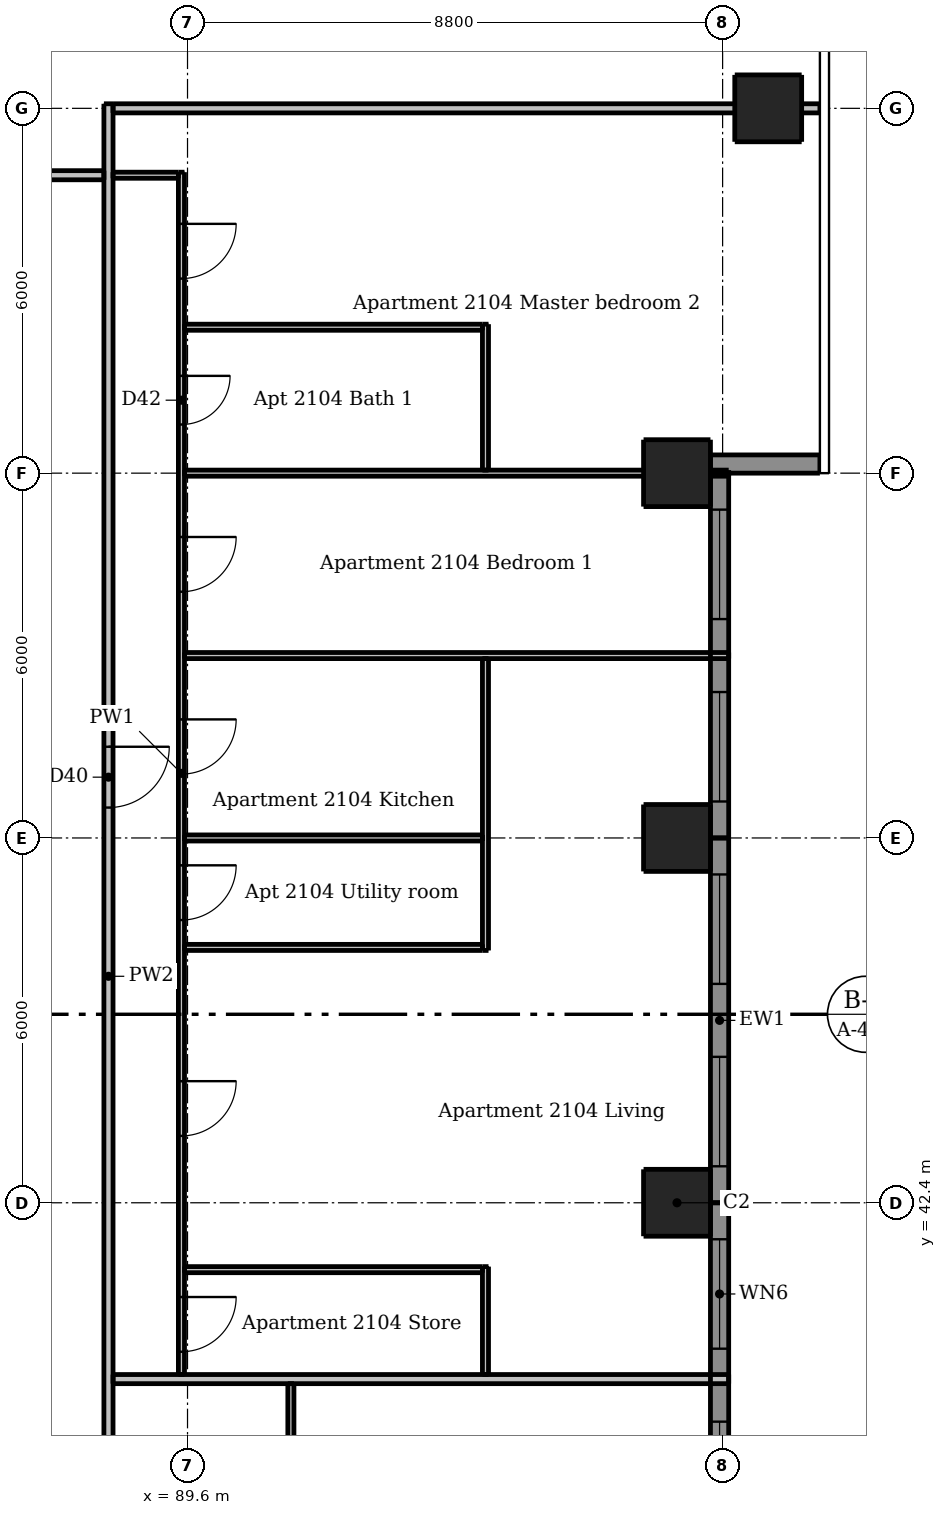
"""IFC4 building model, lengths in metres.
Left out: names, types, materials, properties, quantities, classifications, styles, units other than length and angle.
Written with IfcOpenShell. Run it as: python <this file> out.ifc"""

import sys

from ifc_helpers import new_model, si_unit, direction, frame, frame_2d, origin, origin_2d, place, context, subcontext, project, spatial, rectangle, extrude, element, fill, save


model = new_model("IFC4")
c1 = context("Model", 3, precision=1e-05, world=origin(), true_north=direction((0.0, 1.0)))
c2 = subcontext(c1, "Body", "Model", "MODEL_VIEW")
j1 = project(units=[si_unit("LENGTHUNIT", "METRE"), si_unit("PLANEANGLEUNIT", "RADIAN")], contexts=[c1])
p1 = place(None, origin())
s1 = spatial("IfcSite", under=j1, at=p1, CompositionType="ELEMENT")
p2 = place(p1, origin())
s2 = spatial("IfcBuilding", under=s1, at=p2, CompositionType="ELEMENT")
p3 = place(p2, frame((0.0, 0.0, 82.0)))
s3 = spatial("IfcBuildingStorey", under=s2, at=p3, CompositionType="ELEMENT", Elevation=82.0)
for number, where, z_axis, x_axis in (
    (1, (97.65, 42.4, 0.0), (0.0, 0.0, 1.0), (1.0, 0.0, 0.0)),
    (2, (97.65, 48.4, 0.0), (0.0, 0.0, 1.0), (1.0, 0.0, 0.0)),
    (3, (97.65, 54.4, 0.0), (0.0, 0.0, 1.0), (1.0, 0.0, 0.0)),
    (4, (99.15, 60.4, 0.0), (0.0, 0.0, 1.0), (1.0, 0.0, 0.0)),
):
    element("IfcColumn", number, at=place(p3, frame(where, z_axis=z_axis, x_axis=x_axis)), inside=s3, PredefinedType="COLUMN", context=c2, shape_type="SweptSolid", body=[
        extrude(rectangle(XDim=1.1, YDim=1.1, at=origin_2d()), origin(), (0.0, 0.0, 1.0), 3.05),
    ])
p4 = place(p3, frame((98.2, 54.55, 0.0), z_axis=(0.0, 0.0, 1.0), x_axis=(1.0, 0.0, 0.0)))
e5 = element("IfcWall", 5, at=p4, inside=s3, PredefinedType="SOLIDWALL", context=c2, shape_type="SweptSolid", body=[
    extrude(rectangle(XDim=1.8, YDim=0.3, at=frame_2d((0.9, 0.0))), origin(), (0.0, 0.0, 1.0), 3.05),
])
p5 = place(p3, frame((98.35, 36.7, 0.0), z_axis=(0.0, 0.0, 1.0), x_axis=(0.0, 1.0, 0.0)))
e6 = element("IfcWall", 6, at=p5, inside=s3, PredefinedType="SOLIDWALL", context=c2, shape_type="SweptSolid", body=[
    extrude(rectangle(XDim=5.7, YDim=0.3, at=frame_2d((2.85, 0.0))), origin(), (0.0, 0.0, 1.0), 3.05),
])
p6 = place(p5, frame((0.3, 0.0, 0.15)))
e7 = element("IfcOpeningElement", 7, at=p6, cuts=e6, PredefinedType="OPENING", context=c2, shape_type="SweptSolid", body=[
    extrude(rectangle(XDim=1.8, YDim=2.1, at=frame_2d((0.9, 1.05))), frame((0.0, 0.16, 0.0), z_axis=(0.0, -1.0, 0.0), x_axis=(1.0, 0.0, 0.0)), (0.0, 0.0, 1.0), 0.32),
])
p7 = place(p5, frame((3.3, 0.0, 0.15)))
e8 = element("IfcOpeningElement", 8, at=p7, cuts=e6, PredefinedType="OPENING", context=c2, shape_type="SweptSolid", body=[
    extrude(rectangle(XDim=1.8, YDim=2.1, at=frame_2d((0.9, 1.05))), frame((0.0, 0.16, 0.0), z_axis=(0.0, -1.0, 0.0), x_axis=(1.0, 0.0, 0.0)), (0.0, 0.0, 1.0), 0.32),
])
p8 = place(p3, frame((98.35, 42.4, 0.0), z_axis=(0.0, 0.0, 1.0), x_axis=(0.0, 1.0, 0.0)))
e9 = element("IfcWall", 9, at=p8, inside=s3, PredefinedType="SOLIDWALL", context=c2, shape_type="SweptSolid", body=[
    extrude(rectangle(XDim=6.0, YDim=0.3, at=frame_2d((3.0, 0.0))), origin(), (0.0, 0.0, 1.0), 3.05),
])
p9 = place(p8, frame((0.6, 0.0, 0.15)))
e10 = element("IfcOpeningElement", 10, at=p9, cuts=e9, PredefinedType="OPENING", context=c2, shape_type="SweptSolid", body=[
    extrude(rectangle(XDim=1.8, YDim=2.1, at=frame_2d((0.9, 1.05))), frame((0.0, 0.16, 0.0), z_axis=(0.0, -1.0, 0.0), x_axis=(1.0, 0.0, 0.0)), (0.0, 0.0, 1.0), 0.32),
])
p10 = place(p8, frame((3.6, 0.0, 0.15)))
e11 = element("IfcOpeningElement", 11, at=p10, cuts=e9, PredefinedType="OPENING", context=c2, shape_type="SweptSolid", body=[
    extrude(rectangle(XDim=1.8, YDim=2.1, at=frame_2d((0.9, 1.05))), frame((0.0, 0.16, 0.0), z_axis=(0.0, -1.0, 0.0), x_axis=(1.0, 0.0, 0.0)), (0.0, 0.0, 1.0), 0.32),
])
p11 = place(p3, frame((98.35, 48.4, 0.0), z_axis=(0.0, 0.0, 1.0), x_axis=(0.0, 1.0, 0.0)))
e12 = element("IfcWall", 12, at=p11, inside=s3, PredefinedType="SOLIDWALL", context=c2, shape_type="SweptSolid", body=[
    extrude(rectangle(XDim=6.0, YDim=0.3, at=frame_2d((3.0, 0.0))), origin(), (0.0, 0.0, 1.0), 3.05),
])
p12 = place(p11, frame((0.6, 0.0, 0.15)))
e13 = element("IfcOpeningElement", 13, at=p12, cuts=e12, PredefinedType="OPENING", context=c2, shape_type="SweptSolid", body=[
    extrude(rectangle(XDim=1.8, YDim=2.1, at=frame_2d((0.9, 1.05))), frame((0.0, 0.16, 0.0), z_axis=(0.0, -1.0, 0.0), x_axis=(1.0, 0.0, 0.0)), (0.0, 0.0, 1.0), 0.32),
])
p13 = place(p11, frame((3.6, 0.0, 0.15)))
e14 = element("IfcOpeningElement", 14, at=p13, cuts=e12, PredefinedType="OPENING", context=c2, shape_type="SweptSolid", body=[
    extrude(rectangle(XDim=1.8, YDim=2.1, at=frame_2d((0.9, 1.05))), frame((0.0, 0.16, 0.0), z_axis=(0.0, -1.0, 0.0), x_axis=(1.0, 0.0, 0.0)), (0.0, 0.0, 1.0), 0.32),
])
p14 = place(p3, frame((89.5, 59.35, 0.0), z_axis=(0.0, 0.0, 1.0), x_axis=(0.0, -1.0, 0.0)))
e15 = element("IfcWall", 15, at=p14, inside=s3, PredefinedType="PARTITIONING", context=c2, shape_type="SweptSolid", body=[
    extrude(rectangle(XDim=19.775, YDim=0.1, at=frame_2d((9.888, 0.0))), origin(), (0.0, 0.0, 1.0), 2.51),
])
p15 = place(p14, frame((14.95, 0.0, 0.0)))
e16 = element("IfcOpeningElement", 16, at=p15, cuts=e15, PredefinedType="OPENING", context=c2, shape_type="SweptSolid", body=[
    extrude(rectangle(XDim=0.9, YDim=2.1, at=frame_2d((0.45, 1.05))), frame((0.0, 0.06, 0.0), z_axis=(0.0, -1.0, 0.0), x_axis=(1.0, 0.0, 0.0)), (0.0, 0.0, 1.0), 0.12),
])
p16 = place(p14, frame((9.0, 0.0, 0.0)))
e17 = element("IfcOpeningElement", 17, at=p16, cuts=e15, PredefinedType="OPENING", context=c2, shape_type="SweptSolid", body=[
    extrude(rectangle(XDim=0.9, YDim=2.1, at=frame_2d((0.45, 1.05))), frame((0.0, 0.06, 0.0), z_axis=(0.0, -1.0, 0.0), x_axis=(1.0, 0.0, 0.0)), (0.0, 0.0, 1.0), 0.12),
])
p17 = place(p14, frame((11.4, 0.0, 0.0)))
e18 = element("IfcOpeningElement", 18, at=p17, cuts=e15, PredefinedType="OPENING", context=c2, shape_type="SweptSolid", body=[
    extrude(rectangle(XDim=0.9, YDim=2.1, at=frame_2d((0.45, 1.05))), frame((0.0, 0.06, 0.0), z_axis=(0.0, -1.0, 0.0), x_axis=(1.0, 0.0, 0.0)), (0.0, 0.0, 1.0), 0.12),
])
p18 = place(p14, frame((18.5, 0.0, 0.0)))
e19 = element("IfcOpeningElement", 19, at=p18, cuts=e15, PredefinedType="OPENING", context=c2, shape_type="SweptSolid", body=[
    extrude(rectangle(XDim=0.9, YDim=2.1, at=frame_2d((0.45, 1.05))), frame((0.0, 0.06, 0.0), z_axis=(0.0, -1.0, 0.0), x_axis=(1.0, 0.0, 0.0)), (0.0, 0.0, 1.0), 0.12),
])
p19 = place(p14, frame((6.0, 0.0, 0.0)))
e20 = element("IfcOpeningElement", 20, at=p19, cuts=e15, PredefinedType="OPENING", context=c2, shape_type="SweptSolid", body=[
    extrude(rectangle(XDim=0.9, YDim=2.1, at=frame_2d((0.45, 1.05))), frame((0.0, 0.06, 0.0), z_axis=(0.0, -1.0, 0.0), x_axis=(1.0, 0.0, 0.0)), (0.0, 0.0, 1.0), 0.12),
])
p20 = place(p14, frame((0.85, 0.0, 0.0)))
e21 = element("IfcOpeningElement", 21, at=p20, cuts=e15, PredefinedType="OPENING", context=c2, shape_type="SweptSolid", body=[
    extrude(rectangle(XDim=0.9, YDim=2.1, at=frame_2d((0.45, 1.05))), frame((0.0, 0.06, 0.0), z_axis=(0.0, -1.0, 0.0), x_axis=(1.0, 0.0, 0.0)), (0.0, 0.0, 1.0), 0.12),
])
p21 = place(p14, frame((3.35, 0.0, 0.0)))
e22 = element("IfcOpeningElement", 22, at=p21, cuts=e15, PredefinedType="OPENING", context=c2, shape_type="SweptSolid", body=[
    extrude(rectangle(XDim=0.8, YDim=2.1, at=frame_2d((0.4, 1.05))), frame((0.0, 0.06, 0.0), z_axis=(0.0, -1.0, 0.0), x_axis=(1.0, 0.0, 0.0)), (0.0, 0.0, 1.0), 0.12),
])
p22 = place(p3, frame((91.3, 33.45, 0.0), z_axis=(0.0, 0.0, 1.0), x_axis=(0.0, 1.0, 0.0)))
e23 = element("IfcWall", 23, at=p22, inside=s3, PredefinedType="PARTITIONING", context=c2, shape_type="SweptSolid", body=[
    extrude(rectangle(XDim=5.975, YDim=0.1, at=frame_2d((2.988, 0.0))), origin(), (0.0, 0.0, 1.0), 3.05),
])
p23 = place(p22, frame((3.8, 0.0, 0.0)))
e24 = element("IfcOpeningElement", 24, at=p23, cuts=e23, PredefinedType="OPENING", context=c2, shape_type="SweptSolid", body=[
    extrude(rectangle(XDim=0.8, YDim=2.1, at=frame_2d((0.4, 1.05))), frame((0.0, 0.06, 0.0), z_axis=(0.0, -1.0, 0.0), x_axis=(1.0, 0.0, 0.0)), (0.0, 0.0, 1.0), 0.12),
])
p24 = place(p3, frame((94.5, 39.575, 0.0), z_axis=(0.0, 0.0, 1.0), x_axis=(0.0, 1.0, 0.0)))
e25 = element("IfcWall", 25, at=p24, inside=s3, PredefinedType="PARTITIONING", context=c2, shape_type="SweptSolid", body=[
    extrude(rectangle(XDim=1.775, YDim=0.1, at=frame_2d((0.888, 0.0))), origin(), (0.0, 0.0, 1.0), 3.05),
])
p25 = place(p3, frame((94.5, 46.55, 0.0), z_axis=(0.0, 0.0, 1.0), x_axis=(0.0, 1.0, 0.0)))
e26 = element("IfcWall", 26, at=p25, inside=s3, PredefinedType="PARTITIONING", context=c2, shape_type="SweptSolid", body=[
    extrude(rectangle(XDim=4.8, YDim=0.1, at=frame_2d((2.4, 0.0))), origin(), (0.0, 0.0, 1.0), 3.05),
])
p26 = place(p3, frame((94.5, 54.45, 0.0), z_axis=(0.0, 0.0, 1.0), x_axis=(0.0, 1.0, 0.0)))
e27 = element("IfcWall", 27, at=p26, inside=s3, PredefinedType="PARTITIONING", context=c2, shape_type="SweptSolid", body=[
    extrude(rectangle(XDim=2.4, YDim=0.1, at=frame_2d((1.2, 0.0))), origin(), (0.0, 0.0, 1.0), 3.05),
])
p27 = place(p3, frame((88.375, 59.3, 0.0), z_axis=(0.0, 0.0, 1.0), x_axis=(1.0, 0.0, 0.0)))
e28 = element("IfcWall", 28, at=p27, inside=s3, PredefinedType="PARTITIONING", context=c2, shape_type="SweptSolid", body=[
    extrude(rectangle(XDim=1.075, YDim=0.1, at=frame_2d((0.538, 0.0))), origin(), (0.0, 0.0, 1.0), 3.05),
])
p28 = place(p3, frame((89.55, 56.8, 0.0), z_axis=(0.0, 0.0, 1.0), x_axis=(1.0, 0.0, 0.0)))
e29 = element("IfcWall", 29, at=p28, inside=s3, PredefinedType="PARTITIONING", context=c2, shape_type="SweptSolid", body=[
    extrude(rectangle(XDim=4.9, YDim=0.1, at=frame_2d((2.45, 0.0))), origin(), (0.0, 0.0, 1.0), 3.05),
])
p29 = place(p3, frame((89.55, 54.4, 0.0), z_axis=(0.0, 0.0, 1.0), x_axis=(1.0, 0.0, 0.0)))
e30 = element("IfcWall", 30, at=p29, inside=s3, PredefinedType="PARTITIONING", context=c2, shape_type="SweptSolid", body=[
    extrude(rectangle(XDim=8.95, YDim=0.1, at=frame_2d((4.475, 0.0))), origin(), (0.0, 0.0, 1.0), 2.516),
])
p30 = place(p3, frame((89.55, 51.4, 0.0), z_axis=(0.0, 0.0, 1.0), x_axis=(1.0, 0.0, 0.0)))
e31 = element("IfcWall", 31, at=p30, inside=s3, PredefinedType="PARTITIONING", context=c2, shape_type="SweptSolid", body=[
    extrude(rectangle(XDim=8.95, YDim=0.1, at=frame_2d((4.475, 0.0))), origin(), (0.0, 0.0, 1.0), 3.05),
])
p31 = place(p3, frame((89.55, 48.4, 0.0), z_axis=(0.0, 0.0, 1.0), x_axis=(1.0, 0.0, 0.0)))
e32 = element("IfcWall", 32, at=p31, inside=s3, PredefinedType="PARTITIONING", context=c2, shape_type="SweptSolid", body=[
    extrude(rectangle(XDim=4.9, YDim=0.1, at=frame_2d((2.45, 0.0))), origin(), (0.0, 0.0, 1.0), 2.516),
])
for number, where, z_axis, x_axis in (
    (33, (89.55, 46.6, 0.0), (0.0, 0.0, 1.0), (1.0, 0.0, 0.0)),
    (34, (89.55, 41.3, 0.0), (0.0, 0.0, 1.0), (1.0, 0.0, 0.0)),
):
    element("IfcWall", number, at=place(p3, frame(where, z_axis=z_axis, x_axis=x_axis)), inside=s3, PredefinedType="PARTITIONING", context=c2, shape_type="SweptSolid", body=[
        extrude(rectangle(XDim=4.9, YDim=0.1, at=frame_2d((2.45, 0.0))), origin(), (0.0, 0.0, 1.0), 3.05),
    ])
p32 = place(p3, frame((88.3, 60.475, 0.0), z_axis=(0.0, 0.0, 1.0), x_axis=(0.0, -1.0, 0.0)))
e35 = element("IfcWall", 35, at=p32, inside=s3, PredefinedType="PARTITIONING", context=c2, shape_type="SweptSolid", body=[
    extrude(rectangle(XDim=28.7, YDim=0.15, at=frame_2d((14.35, 0.0))), origin(), (0.0, 0.0, 1.0), 3.05),
])
p33 = place(p32, frame((27.425, 0.0, 0.0)))
e36 = element("IfcOpeningElement", 36, at=p33, cuts=e35, PredefinedType="OPENING", context=c2, shape_type="SweptSolid", body=[
    extrude(rectangle(XDim=1.0, YDim=2.1, at=frame_2d((0.5, 1.05))), frame((0.0, 0.085, 0.0), z_axis=(0.0, -1.0, 0.0), x_axis=(1.0, 0.0, 0.0)), (0.0, 0.0, 1.0), 0.17),
])
p34 = place(p32, frame((10.575, 0.0, 0.0)))
e37 = element("IfcOpeningElement", 37, at=p34, cuts=e35, PredefinedType="OPENING", context=c2, shape_type="SweptSolid", body=[
    extrude(rectangle(XDim=1.0, YDim=2.1, at=frame_2d((0.5, 1.05))), frame((0.0, 0.085, 0.0), z_axis=(0.0, -1.0, 0.0), x_axis=(1.0, 0.0, 0.0)), (0.0, 0.0, 1.0), 0.17),
])
p35 = place(p3, frame((88.375, 60.4, 0.0), z_axis=(0.0, 0.0, 1.0), x_axis=(1.0, 0.0, 0.0)))
e38 = element("IfcWall", 38, at=p35, inside=s3, PredefinedType="PARTITIONING", context=c2, shape_type="SweptSolid", body=[
    extrude(rectangle(XDim=11.625, YDim=0.15, at=frame_2d((5.812, 0.0))), origin(), (0.0, 0.0, 1.0), 2.516),
])
p36 = place(p3, frame((59.675, 59.3, 0.0), z_axis=(0.0, 0.0, 1.0), x_axis=(1.0, 0.0, 0.0)))
e39 = element("IfcWall", 39, at=p36, inside=s3, PredefinedType="PARTITIONING", context=c2, shape_type="SweptSolid", body=[
    extrude(rectangle(XDim=28.55, YDim=0.15, at=frame_2d((14.275, 0.0))), origin(), (0.0, 0.0, 1.0), 3.05),
])
p37 = place(p36, frame((8.975, 0.0, 0.0)))
e40 = element("IfcOpeningElement", 40, at=p37, cuts=e39, PredefinedType="OPENING", context=c2, shape_type="SweptSolid", body=[
    extrude(rectangle(XDim=1.0, YDim=2.1, at=frame_2d((0.5, 1.05))), frame((0.0, 0.085, 0.0), z_axis=(0.0, -1.0, 0.0), x_axis=(1.0, 0.0, 0.0)), (0.0, 0.0, 1.0), 0.17),
])
p38 = place(p36, frame((25.775, 0.0, 0.0)))
e41 = element("IfcOpeningElement", 41, at=p38, cuts=e39, PredefinedType="OPENING", context=c2, shape_type="SweptSolid", body=[
    extrude(rectangle(XDim=1.0, YDim=2.1, at=frame_2d((0.5, 1.05))), frame((0.0, 0.085, 0.0), z_axis=(0.0, -1.0, 0.0), x_axis=(1.0, 0.0, 0.0)), (0.0, 0.0, 1.0), 0.17),
])
p39 = place(p3, frame((88.375, 39.5, 0.0), z_axis=(0.0, 0.0, 1.0), x_axis=(1.0, 0.0, 0.0)))
e42 = element("IfcWall", 42, at=p39, inside=s3, PredefinedType="PARTITIONING", context=c2, shape_type="SweptSolid", body=[
    extrude(rectangle(XDim=10.125, YDim=0.15, at=frame_2d((5.062, 0.0))), origin(), (0.0, 0.0, 1.0), 3.05),
])
p40 = place(p6, origin())
e43 = element("IfcWindow", 43, at=p40, inside=s3, PartitioningType="DOUBLE_PANEL_VERTICAL", PredefinedType="WINDOW", context=c2, shape_type="SweptSolid", body=[
    extrude(rectangle(XDim=1.8, YDim=2.1, at=frame_2d((0.9, 1.05))), frame((0.0, 0.03, 0.0), z_axis=(0.0, -1.0, 0.0), x_axis=(1.0, 0.0, 0.0)), (0.0, 0.0, 1.0), 0.06),
])
fill(e7, e43)
p41 = place(p7, origin())
e44 = element("IfcWindow", 44, at=p41, inside=s3, PartitioningType="DOUBLE_PANEL_VERTICAL", PredefinedType="WINDOW", context=c2, shape_type="SweptSolid", body=[
    extrude(rectangle(XDim=1.8, YDim=2.1, at=frame_2d((0.9, 1.05))), frame((0.0, 0.03, 0.0), z_axis=(0.0, -1.0, 0.0), x_axis=(1.0, 0.0, 0.0)), (0.0, 0.0, 1.0), 0.06),
])
fill(e8, e44)
p42 = place(p9, origin())
e45 = element("IfcWindow", 45, at=p42, inside=s3, PartitioningType="DOUBLE_PANEL_VERTICAL", PredefinedType="WINDOW", context=c2, shape_type="SweptSolid", body=[
    extrude(rectangle(XDim=1.8, YDim=2.1, at=frame_2d((0.9, 1.05))), frame((0.0, 0.03, 0.0), z_axis=(0.0, -1.0, 0.0), x_axis=(1.0, 0.0, 0.0)), (0.0, 0.0, 1.0), 0.06),
])
fill(e10, e45)
p43 = place(p10, origin())
e46 = element("IfcWindow", 46, at=p43, inside=s3, PartitioningType="DOUBLE_PANEL_VERTICAL", PredefinedType="WINDOW", context=c2, shape_type="SweptSolid", body=[
    extrude(rectangle(XDim=1.8, YDim=2.1, at=frame_2d((0.9, 1.05))), frame((0.0, 0.03, 0.0), z_axis=(0.0, -1.0, 0.0), x_axis=(1.0, 0.0, 0.0)), (0.0, 0.0, 1.0), 0.06),
])
fill(e11, e46)
p44 = place(p12, origin())
e47 = element("IfcWindow", 47, at=p44, inside=s3, PartitioningType="DOUBLE_PANEL_VERTICAL", PredefinedType="WINDOW", context=c2, shape_type="SweptSolid", body=[
    extrude(rectangle(XDim=1.8, YDim=2.1, at=frame_2d((0.9, 1.05))), frame((0.0, 0.03, 0.0), z_axis=(0.0, -1.0, 0.0), x_axis=(1.0, 0.0, 0.0)), (0.0, 0.0, 1.0), 0.06),
])
fill(e13, e47)
p45 = place(p13, origin())
e48 = element("IfcWindow", 48, at=p45, inside=s3, PartitioningType="DOUBLE_PANEL_VERTICAL", PredefinedType="WINDOW", context=c2, shape_type="SweptSolid", body=[
    extrude(rectangle(XDim=1.8, YDim=2.1, at=frame_2d((0.9, 1.05))), frame((0.0, 0.03, 0.0), z_axis=(0.0, -1.0, 0.0), x_axis=(1.0, 0.0, 0.0)), (0.0, 0.0, 1.0), 0.06),
])
fill(e14, e48)
p46 = place(p34, origin())
e49 = element("IfcDoor", 49, at=p46, inside=s3, OperationType="SINGLE_SWING_LEFT", PredefinedType="DOOR", context=c2, shape_type="SweptSolid", body=[
    extrude(rectangle(XDim=1.0, YDim=2.1, at=frame_2d((0.5, 1.05))), frame((0.0, 0.025, 0.0), z_axis=(0.0, -1.0, 0.0), x_axis=(1.0, 0.0, 0.0)), (0.0, 0.0, 1.0), 0.05),
])
fill(e37, e49)
p47 = place(p15, origin())
e50 = element("IfcDoor", 50, at=p47, inside=s3, OperationType="SINGLE_SWING_LEFT", PredefinedType="DOOR", context=c2, shape_type="SweptSolid", body=[
    extrude(rectangle(XDim=0.9, YDim=2.1, at=frame_2d((0.45, 1.05))), frame((0.0, 0.025, 0.0), z_axis=(0.0, -1.0, 0.0), x_axis=(1.0, 0.0, 0.0)), (0.0, 0.0, 1.0), 0.05),
])
fill(e16, e50)
p48 = place(p16, origin())
e51 = element("IfcDoor", 51, at=p48, inside=s3, OperationType="SINGLE_SWING_LEFT", PredefinedType="DOOR", context=c2, shape_type="SweptSolid", body=[
    extrude(rectangle(XDim=0.9, YDim=2.1, at=frame_2d((0.45, 1.05))), frame((0.0, 0.025, 0.0), z_axis=(0.0, -1.0, 0.0), x_axis=(1.0, 0.0, 0.0)), (0.0, 0.0, 1.0), 0.05),
])
fill(e17, e51)
p49 = place(p17, origin())
e52 = element("IfcDoor", 52, at=p49, inside=s3, OperationType="SINGLE_SWING_LEFT", PredefinedType="DOOR", context=c2, shape_type="SweptSolid", body=[
    extrude(rectangle(XDim=0.9, YDim=2.1, at=frame_2d((0.45, 1.05))), frame((0.0, 0.025, 0.0), z_axis=(0.0, -1.0, 0.0), x_axis=(1.0, 0.0, 0.0)), (0.0, 0.0, 1.0), 0.05),
])
fill(e18, e52)
p50 = place(p18, origin())
e53 = element("IfcDoor", 53, at=p50, inside=s3, OperationType="SINGLE_SWING_LEFT", PredefinedType="DOOR", context=c2, shape_type="SweptSolid", body=[
    extrude(rectangle(XDim=0.9, YDim=2.1, at=frame_2d((0.45, 1.05))), frame((0.0, 0.025, 0.0), z_axis=(0.0, -1.0, 0.0), x_axis=(1.0, 0.0, 0.0)), (0.0, 0.0, 1.0), 0.05),
])
fill(e19, e53)
p51 = place(p19, origin())
e54 = element("IfcDoor", 54, at=p51, inside=s3, OperationType="SINGLE_SWING_LEFT", PredefinedType="DOOR", context=c2, shape_type="SweptSolid", body=[
    extrude(rectangle(XDim=0.9, YDim=2.1, at=frame_2d((0.45, 1.05))), frame((0.0, 0.025, 0.0), z_axis=(0.0, -1.0, 0.0), x_axis=(1.0, 0.0, 0.0)), (0.0, 0.0, 1.0), 0.05),
])
fill(e20, e54)
p52 = place(p20, origin())
e55 = element("IfcDoor", 55, at=p52, inside=s3, OperationType="SINGLE_SWING_LEFT", PredefinedType="DOOR", context=c2, shape_type="SweptSolid", body=[
    extrude(rectangle(XDim=0.9, YDim=2.1, at=frame_2d((0.45, 1.05))), frame((0.0, 0.025, 0.0), z_axis=(0.0, -1.0, 0.0), x_axis=(1.0, 0.0, 0.0)), (0.0, 0.0, 1.0), 0.05),
])
fill(e21, e55)
p53 = place(p21, origin())
e56 = element("IfcDoor", 56, at=p53, inside=s3, OperationType="SINGLE_SWING_LEFT", PredefinedType="DOOR", context=c2, shape_type="SweptSolid", body=[
    extrude(rectangle(XDim=0.8, YDim=2.1, at=frame_2d((0.4, 1.05))), frame((0.0, 0.025, 0.0), z_axis=(0.0, -1.0, 0.0), x_axis=(1.0, 0.0, 0.0)), (0.0, 0.0, 1.0), 0.05),
])
fill(e22, e56)
save(model, sys.argv[1])
